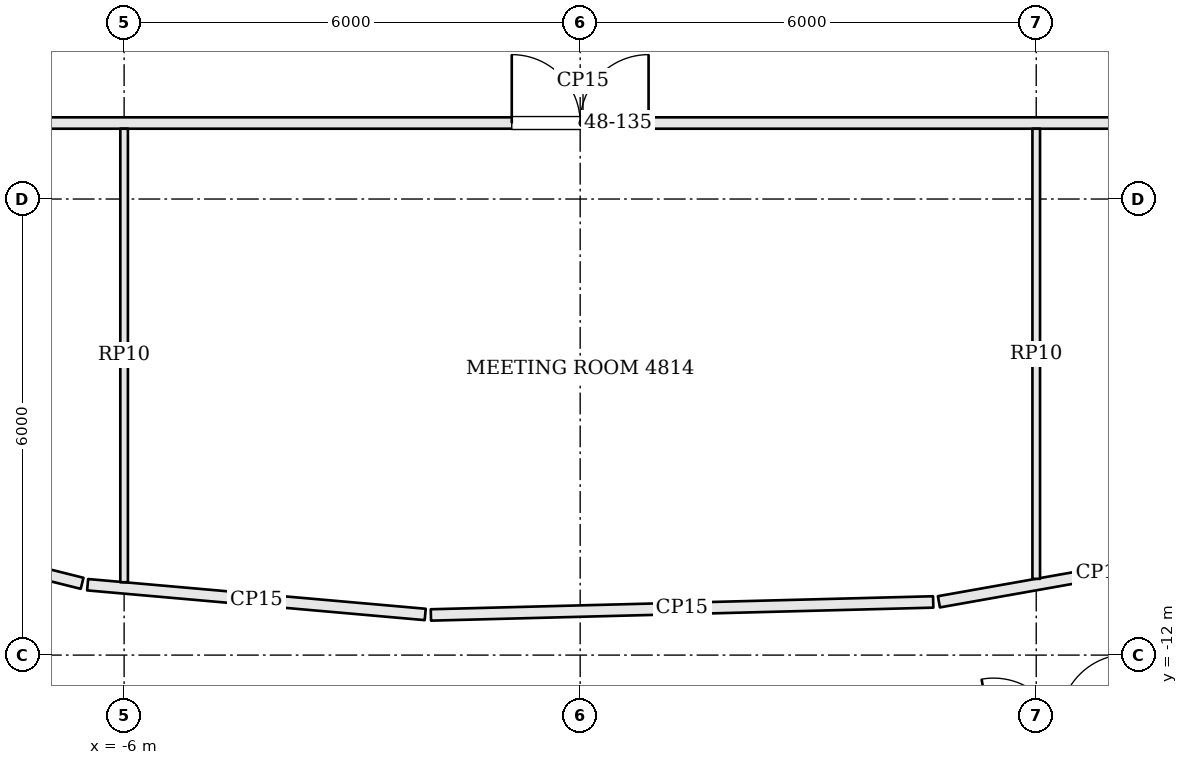
"""IFC4 building model, lengths in metres.
Left out: names, types, materials, properties, quantities, classifications, styles, units other than length and angle.
Written with IfcOpenShell. Run it as: python <this file> out.ifc"""

import sys

from ifc_helpers import new_model, si_unit, direction, frame, frame_2d, origin, place, context, subcontext, project, spatial, rectangle, extrude, element, fill, save


model = new_model("IFC4")
c1 = context("Model", 3, precision=1e-05, world=origin(), true_north=direction((0.0, 1.0)))
c2 = subcontext(c1, "Body", "Model", "MODEL_VIEW")
j1 = project(units=[si_unit("LENGTHUNIT", "METRE"), si_unit("PLANEANGLEUNIT", "RADIAN")], contexts=[c1])
p1 = place(None, origin())
s1 = spatial("IfcSite", under=j1, at=p1, CompositionType="ELEMENT")
p2 = place(p1, origin())
s2 = spatial("IfcBuilding", under=s1, at=p2, CompositionType="ELEMENT")
p3 = place(p2, frame((0.0, 0.0, 197.4)))
s3 = spatial("IfcBuildingStorey", under=s2, at=p3, CompositionType="ELEMENT", Elevation=197.4)
p4 = place(p3, frame((-11.351, -11.908, 0.0), z_axis=(0.0, 0.0, 1.0), x_axis=(0.969630935796, -0.244572787421, 0.0)))
e1 = element("IfcWall", 1, at=p4, inside=s3, PredefinedType="PARTITIONING", context=c2, shape_type="SweptSolid", body=[
    extrude(rectangle(XDim=4.68, YDim=0.15, at=frame_2d((2.34, 0.0))), origin(), (0.0, 0.0, 1.0), 3.084),
])
p5 = place(p4, frame((1.751, 0.0, 0.0)))
e2 = element("IfcOpeningElement", 2, at=p5, cuts=e1, PredefinedType="OPENING", context=c2, shape_type="SweptSolid", body=[
    extrude(rectangle(XDim=1.8, YDim=2.1, at=frame_2d((0.9, 1.05))), frame((0.0, 0.085, 0.0), z_axis=(0.0, -1.0, 0.0), x_axis=(1.0, 0.0, 0.0)), (0.0, 0.0, 1.0), 0.17),
])
p6 = place(p3, frame((4.995, -13.281, 0.0), z_axis=(0.0, 0.0, 1.0), x_axis=(0.98463411377, 0.174630071865, 0.0)))
e3 = element("IfcWall", 3, at=p6, inside=s3, PredefinedType="PARTITIONING", context=c2, shape_type="SweptSolid", body=[
    extrude(rectangle(XDim=4.682, YDim=0.15, at=frame_2d((2.341, 0.0))), origin(), (0.0, 0.0, 1.0), 3.084),
])
p7 = place(p6, frame((0.45, 0.0, 0.0)))
e4 = element("IfcOpeningElement", 4, at=p7, cuts=e3, PredefinedType="OPENING", context=c2, shape_type="SweptSolid", body=[
    extrude(rectangle(XDim=1.8, YDim=2.1, at=frame_2d((0.9, 1.05))), frame((0.0, 0.085, 0.0), z_axis=(0.0, -1.0, 0.0), x_axis=(1.0, 0.0, 0.0)), (0.0, 0.0, 1.0), 0.17),
])
p8 = place(p3, frame((9.01, -10.538, 0.0), z_axis=(0.0, 0.0, 1.0), x_axis=(-0.984645638575, -0.174565077936, 0.0)))
e5 = element("IfcWall", 5, at=p8, inside=s3, PredefinedType="PARTITIONING", context=c2, shape_type="SweptSolid", body=[
    extrude(rectangle(XDim=4.358, YDim=0.15, at=frame_2d((2.179, 0.0))), origin(), (0.0, 0.0, 1.0), 3.084),
])
p9 = place(p3, frame((4.645, -11.301, 0.0), z_axis=(0.0, 0.0, 1.0), x_axis=(-0.9996648469, -0.02588810291, 0.0)))
e6 = element("IfcWall", 6, at=p9, inside=s3, PredefinedType="PARTITIONING", context=c2, shape_type="SweptSolid", body=[
    extrude(rectangle(XDim=6.611, YDim=0.15, at=frame_2d((3.305, 0.0))), origin(), (0.0, 0.0, 1.0), 3.084),
])
p10 = place(p3, frame((-2.039, -11.465, 0.0), z_axis=(0.0, 0.0, 1.0), x_axis=(-0.996139855484, 0.087780341286, 0.0)))
e7 = element("IfcWall", 7, at=p10, inside=s3, PredefinedType="PARTITIONING", context=c2, shape_type="SweptSolid", body=[
    extrude(rectangle(XDim=4.458, YDim=0.15, at=frame_2d((2.229, 0.0))), origin(), (0.0, 0.0, 1.0), 3.084),
])
p11 = place(p3, frame((-6.553, -11.056, 0.0), z_axis=(0.0, 0.0, 1.0), x_axis=(-0.970004917182, 0.243085294995, 0.0)))
e8 = element("IfcWall", 8, at=p11, inside=s3, PredefinedType="PARTITIONING", context=c2, shape_type="SweptSolid", body=[
    extrude(rectangle(XDim=4.284, YDim=0.15, at=frame_2d((2.142, 0.0))), origin(), (0.0, 0.0, 1.0), 3.084),
])
p12 = place(p3, frame((-14.925, -5.0, 0.0), z_axis=(0.0, 0.0, 1.0), x_axis=(1.0, 0.0, 0.0)))
e9 = element("IfcWall", 9, at=p12, inside=s3, PredefinedType="PARTITIONING", context=c2, shape_type="SweptSolid", body=[
    extrude(rectangle(XDim=29.925, YDim=0.15, at=frame_2d((14.962, 0.0))), origin(), (0.0, 0.0, 1.0), 3.084),
])
p13 = place(p12, frame((3.925, 0.0, 0.0)))
e10 = element("IfcOpeningElement", 10, at=p13, cuts=e9, PredefinedType="OPENING", context=c2, shape_type="SweptSolid", body=[
    extrude(rectangle(XDim=1.0, YDim=2.1, at=frame_2d((0.5, 1.05))), frame((0.0, 0.085, 0.0), z_axis=(0.0, -1.0, 0.0), x_axis=(1.0, 0.0, 0.0)), (0.0, 0.0, 1.0), 0.17),
])
p14 = place(p12, frame((14.025, 0.0, 0.0)))
e11 = element("IfcOpeningElement", 11, at=p14, cuts=e9, PredefinedType="OPENING", context=c2, shape_type="SweptSolid", body=[
    extrude(rectangle(XDim=1.8, YDim=2.1, at=frame_2d((0.9, 1.05))), frame((0.0, 0.085, 0.0), z_axis=(0.0, -1.0, 0.0), x_axis=(1.0, 0.0, 0.0)), (0.0, 0.0, 1.0), 0.17),
])
p15 = place(p12, frame((24.925, 0.0, 0.0)))
e12 = element("IfcOpeningElement", 12, at=p15, cuts=e9, PredefinedType="OPENING", context=c2, shape_type="SweptSolid", body=[
    extrude(rectangle(XDim=1.0, YDim=2.1, at=frame_2d((0.5, 1.05))), frame((0.0, 0.085, 0.0), z_axis=(0.0, -1.0, 0.0), x_axis=(1.0, 0.0, 0.0)), (0.0, 0.0, 1.0), 0.17),
])
p16 = place(p3, frame((-6.0, -11.041, 0.0), z_axis=(0.0, 0.0, 1.0), x_axis=(0.0, 1.0, 0.0)))
e13 = element("IfcWall", 13, at=p16, inside=s3, PredefinedType="PARTITIONING", context=c2, shape_type="SweptSolid", body=[
    extrude(rectangle(XDim=5.966, YDim=0.1, at=frame_2d((2.983, 0.0))), origin(), (0.0, 0.0, 1.0), 3.084),
])
p17 = place(p3, frame((6.0, -10.997, 0.0), z_axis=(0.0, 0.0, 1.0), x_axis=(0.0, 1.0, 0.0)))
e14 = element("IfcWall", 14, at=p17, inside=s3, PredefinedType="PARTITIONING", context=c2, shape_type="SweptSolid", body=[
    extrude(rectangle(XDim=5.922, YDim=0.1, at=frame_2d((2.961, 0.0))), origin(), (0.0, 0.0, 1.0), 3.084),
])
p18 = place(p14, origin())
e15 = element("IfcDoor", 15, at=p18, inside=s3, OperationType="DOUBLE_DOOR_SINGLE_SWING", PredefinedType="DOOR", context=c2, shape_type="SweptSolid", body=[
    extrude(rectangle(XDim=1.8, YDim=2.1, at=frame_2d((0.9, 1.05))), frame((0.0, 0.025, 0.0), z_axis=(0.0, -1.0, 0.0), x_axis=(1.0, 0.0, 0.0)), (0.0, 0.0, 1.0), 0.05),
])
fill(e11, e15)
save(model, sys.argv[1])
